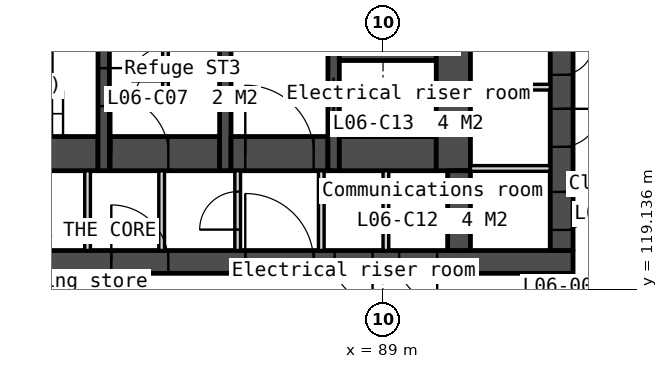
"""IFC4 building model, lengths in metres.
Left out: names, types, materials, properties, quantities, classifications, styles, units other than length and angle.
Written with IfcOpenShell. Run it as: python <this file> out.ifc"""

import sys

from ifc_helpers import new_model, si_unit, direction, frame, frame_2d, origin, place, context, subcontext, project, spatial, polyline, rectangle, outline, extrude, element, fill, save


model = new_model("IFC4")
c1 = context("Model", 3, precision=1e-05, world=origin(), true_north=direction((0.0, 1.0)))
c2 = subcontext(c1, "Body", "Model", "MODEL_VIEW")
j1 = project(units=[si_unit("LENGTHUNIT", "METRE"), si_unit("PLANEANGLEUNIT", "RADIAN")], contexts=[c1])
p1 = place(None, origin())
s1 = spatial("IfcSite", under=j1, at=p1, CompositionType="ELEMENT")
p2 = place(p1, origin())
s2 = spatial("IfcBuilding", under=s1, at=p2, CompositionType="ELEMENT")
p3 = place(p2, frame((0.0, 0.0, 35.0)))
s3 = spatial("IfcBuildingStorey", under=s2, at=p3, CompositionType="ELEMENT", Elevation=35.0)
p4 = place(p3, frame((66.0, 119.85, 0.0), z_axis=(0.0, 0.0, 1.0), x_axis=(1.0, 0.0, 0.0)))
e1 = element("IfcWall", 1, at=p4, inside=s3, PredefinedType="SOLIDWALL", context=c2, shape_type="SweptSolid", body=[
    extrude(rectangle(XDim=28.0, YDim=0.6, at=frame_2d((14.0, 0.0))), origin(), (0.0, 0.0, 1.0), 3.35),
])
p5 = place(p4, frame((6.825, 0.0, 0.0)))
e2 = element("IfcOpeningElement", 2, at=p5, cuts=e1, PredefinedType="OPENING", context=c2, shape_type="SweptSolid", body=[
    extrude(rectangle(XDim=1.8, YDim=2.1, at=frame_2d((0.9, 1.05))), frame((0.0, 0.31, 0.0), z_axis=(0.0, -1.0, 0.0), x_axis=(1.0, 0.0, 0.0)), (0.0, 0.0, 1.0), 0.62),
])
p6 = place(p4, frame((15.85, 0.0, 0.0)))
e3 = element("IfcOpeningElement", 3, at=p6, cuts=e1, PredefinedType="OPENING", context=c2, shape_type="SweptSolid", body=[
    extrude(rectangle(XDim=1.5, YDim=2.1, at=frame_2d((0.75, 1.05))), frame((0.0, 0.31, 0.0), z_axis=(0.0, -1.0, 0.0), x_axis=(1.0, 0.0, 0.0)), (0.0, 0.0, 1.0), 0.62),
])
p7 = place(p4, frame((19.375, 0.0, 0.0)))
e4 = element("IfcOpeningElement", 4, at=p7, cuts=e1, PredefinedType="OPENING", context=c2, shape_type="SweptSolid", body=[
    extrude(rectangle(XDim=1.8, YDim=2.1, at=frame_2d((0.9, 1.05))), frame((0.0, 0.31, 0.0), z_axis=(0.0, -1.0, 0.0), x_axis=(1.0, 0.0, 0.0)), (0.0, 0.0, 1.0), 0.62),
])
p8 = place(p4, frame((4.425, 0.0, 0.0)))
e5 = element("IfcOpeningElement", 5, at=p8, cuts=e1, PredefinedType="OPENING", context=c2, shape_type="SweptSolid", body=[
    extrude(rectangle(XDim=1.0, YDim=2.1, at=frame_2d((0.5, 1.05))), frame((0.0, 0.31, 0.0), z_axis=(0.0, -1.0, 0.0), x_axis=(1.0, 0.0, 0.0)), (0.0, 0.0, 1.0), 0.62),
])
p9 = place(p4, frame((9.925, 0.0, 0.0)))
e6 = element("IfcOpeningElement", 6, at=p9, cuts=e1, PredefinedType="OPENING", context=c2, shape_type="SweptSolid", body=[
    extrude(rectangle(XDim=1.0, YDim=2.1, at=frame_2d((0.5, 1.05))), frame((0.0, 0.31, 0.0), z_axis=(0.0, -1.0, 0.0), x_axis=(1.0, 0.0, 0.0)), (0.0, 0.0, 1.0), 0.62),
])
p10 = place(p4, frame((13.125, 0.0, 0.0)))
e7 = element("IfcOpeningElement", 7, at=p10, cuts=e1, PredefinedType="OPENING", context=c2, shape_type="SweptSolid", body=[
    extrude(rectangle(XDim=1.0, YDim=2.1, at=frame_2d((0.5, 1.05))), frame((0.0, 0.31, 0.0), z_axis=(0.0, -1.0, 0.0), x_axis=(1.0, 0.0, 0.0)), (0.0, 0.0, 1.0), 0.62),
])
p11 = place(p4, frame((21.725, 0.0, 0.0)))
e8 = element("IfcOpeningElement", 8, at=p11, cuts=e1, PredefinedType="OPENING", context=c2, shape_type="SweptSolid", body=[
    extrude(rectangle(XDim=1.0, YDim=2.1, at=frame_2d((0.5, 1.05))), frame((0.0, 0.31, 0.0), z_axis=(0.0, -1.0, 0.0), x_axis=(1.0, 0.0, 0.0)), (0.0, 0.0, 1.0), 0.62),
])
p12 = place(p4, frame((23.425, 0.0, 0.0)))
e9 = element("IfcOpeningElement", 9, at=p12, cuts=e1, PredefinedType="OPENING", context=c2, shape_type="SweptSolid", body=[
    extrude(rectangle(XDim=1.0, YDim=2.1, at=frame_2d((0.5, 1.05))), frame((0.0, 0.31, 0.0), z_axis=(0.0, -1.0, 0.0), x_axis=(1.0, 0.0, 0.0)), (0.0, 0.0, 1.0), 0.62),
])
p13 = place(p3, frame((75.3, 122.7, 0.0), z_axis=(0.0, 0.0, 1.0), x_axis=(1.0, 0.0, 0.0)))
e10 = element("IfcWall", 10, at=p13, inside=s3, PredefinedType="SOLIDWALL", context=c2, shape_type="SweptSolid", body=[
    extrude(rectangle(XDim=6.2, YDim=0.9, at=frame_2d((3.1, 0.0))), origin(), (0.0, 0.0, 1.0), 3.35),
])
p14 = place(p3, frame((81.225, 122.25, 0.0), z_axis=(0.0, 0.0, 1.0), x_axis=(0.0, -1.0, 0.0)))
e11 = element("IfcWall", 11, at=p14, inside=s3, PredefinedType="PARTITIONING", context=c2, shape_type="SweptSolid", body=[
    extrude(rectangle(XDim=2.1, YDim=0.15, at=frame_2d((1.05, 0.0))), origin(), (0.0, 0.0, 1.0), 3.35),
])
p15 = place(p3, frame((81.65, 125.7, 0.0), z_axis=(0.0, 0.0, 1.0), x_axis=(0.0, -1.0, 0.0)))
e12 = element("IfcWall", 12, at=p15, inside=s3, PredefinedType="SOLIDWALL", context=c2, shape_type="SweptSolid", body=[
    extrude(rectangle(XDim=3.45, YDim=0.3, at=frame_2d((1.725, 0.0))), origin(), (0.0, 0.0, 1.0), 3.35),
])
p16 = place(p15, frame((0.75, 0.0, 0.0)))
e13 = element("IfcOpeningElement", 13, at=p16, cuts=e12, PredefinedType="OPENING", context=c2, shape_type="SweptSolid", body=[
    extrude(rectangle(XDim=1.0, YDim=2.1, at=frame_2d((0.5, 1.05))), frame((0.0, 0.16, 0.0), z_axis=(0.0, -1.0, 0.0), x_axis=(1.0, 0.0, 0.0)), (0.0, 0.0, 1.0), 0.32),
])
p17 = place(p3, frame((81.8, 122.7, 0.0), z_axis=(0.0, 0.0, 1.0), x_axis=(1.0, 0.0, 0.0)))
e14 = element("IfcWall", 14, at=p17, inside=s3, PredefinedType="SOLIDWALL", context=c2, shape_type="SweptSolid", body=[
    extrude(rectangle(XDim=2.9, YDim=0.9, at=frame_2d((1.45, 0.0))), origin(), (0.0, 0.0, 1.0), 3.35),
])
p18 = place(p17, frame((0.05, 0.0, 0.0)))
e15 = element("IfcOpeningElement", 15, at=p18, cuts=e14, PredefinedType="OPENING", context=c2, shape_type="SweptSolid", body=[
    extrude(rectangle(XDim=1.5, YDim=2.1, at=frame_2d((0.75, 1.05))), frame((0.0, 0.46, 0.0), z_axis=(0.0, -1.0, 0.0), x_axis=(1.0, 0.0, 0.0)), (0.0, 0.0, 1.0), 0.92),
])
p19 = place(p3, frame((83.175, 122.25, 0.0), z_axis=(0.0, 0.0, 1.0), x_axis=(0.0, -1.0, 0.0)))
e16 = element("IfcWall", 16, at=p19, inside=s3, PredefinedType="PARTITIONING", context=c2, shape_type="SweptSolid", body=[
    extrude(rectangle(XDim=2.1, YDim=0.15, at=frame_2d((1.05, 0.0))), origin(), (0.0, 0.0, 1.0), 3.35),
])
p20 = place(p3, frame((83.275, 125.85, 0.0), z_axis=(0.0, 0.0, 1.0), x_axis=(0.0, -1.0, 0.0)))
e17 = element("IfcWall", 17, at=p20, inside=s3, PredefinedType="PARTITIONING", context=c2, shape_type="SweptSolid", body=[
    extrude(rectangle(XDim=1.75, YDim=0.15, at=frame_2d((0.875, 0.0))), origin(), (0.0, 0.0, 1.0), 3.35),
])
p21 = place(p20, frame((0.35, 0.0, 0.0)))
e18 = element("IfcOpeningElement", 18, at=p21, cuts=e17, PredefinedType="OPENING", context=c2, shape_type="SweptSolid", body=[
    extrude(rectangle(XDim=0.9, YDim=2.1, at=frame_2d((0.45, 1.05))), frame((0.0, 0.085, 0.0), z_axis=(0.0, -1.0, 0.0), x_axis=(1.0, 0.0, 0.0)), (0.0, 0.0, 1.0), 0.17),
])
p22 = place(p3, frame((83.35, 124.175, 0.0), z_axis=(0.0, 0.0, 1.0), x_axis=(1.0, 0.0, 0.0)))
e19 = element("IfcWall", 19, at=p22, inside=s3, PredefinedType="PARTITIONING", context=c2, shape_type="SweptSolid", body=[
    extrude(rectangle(XDim=1.35, YDim=0.15, at=frame_2d((0.675, 0.0))), origin(), (0.0, 0.0, 1.0), 3.35),
])
p23 = place(p3, frame((84.85, 133.95, 0.0), z_axis=(0.0, 0.0, 1.0), x_axis=(0.0, -1.0, 0.0)))
e20 = element("IfcWall", 20, at=p23, inside=s3, PredefinedType="SOLIDWALL", context=c2, shape_type="SweptSolid", body=[
    extrude(rectangle(XDim=11.7, YDim=0.3, at=frame_2d((5.85, 0.0))), origin(), (0.0, 0.0, 1.0), 3.35),
])
p24 = place(p3, frame((85.0, 122.7, 0.0), z_axis=(0.0, 0.0, 1.0), x_axis=(1.0, 0.0, 0.0)))
e21 = element("IfcWall", 21, at=p24, inside=s3, PredefinedType="SOLIDWALL", context=c2, shape_type="SweptSolid", body=[
    extrude(rectangle(XDim=2.55, YDim=0.9, at=frame_2d((1.275, 0.0))), origin(), (0.0, 0.0, 1.0), 3.35),
])
p25 = place(p24, frame((0.375, 0.0, 0.0)))
e22 = element("IfcOpeningElement", 22, at=p25, cuts=e21, PredefinedType="OPENING", context=c2, shape_type="SweptSolid", body=[
    extrude(rectangle(XDim=1.8, YDim=2.1, at=frame_2d((0.9, 1.05))), frame((0.0, 0.46, 0.0), z_axis=(0.0, -1.0, 0.0), x_axis=(1.0, 0.0, 0.0)), (0.0, 0.0, 1.0), 0.92),
])
p26 = place(p3, frame((85.175, 122.25, 0.0), z_axis=(0.0, 0.0, 1.0), x_axis=(0.0, -1.0, 0.0)))
e23 = element("IfcWall", 23, at=p26, inside=s3, PredefinedType="PARTITIONING", context=c2, shape_type="SweptSolid", body=[
    extrude(rectangle(XDim=2.1, YDim=0.15, at=frame_2d((1.05, 0.0))), origin(), (0.0, 0.0, 1.0), 3.35),
])
p27 = place(p26, frame((0.55, 0.0, 0.0)))
e24 = element("IfcOpeningElement", 24, at=p27, cuts=e23, PredefinedType="OPENING", context=c2, shape_type="SweptSolid", body=[
    extrude(rectangle(XDim=1.0, YDim=2.1, at=frame_2d((0.5, 1.05))), frame((0.0, 0.085, 0.0), z_axis=(0.0, -1.0, 0.0), x_axis=(1.0, 0.0, 0.0)), (0.0, 0.0, 1.0), 0.17),
])
p28 = place(p3, frame((87.375, 122.25, 0.0), z_axis=(0.0, 0.0, 1.0), x_axis=(0.0, -1.0, 0.0)))
e25 = element("IfcWall", 25, at=p28, inside=s3, PredefinedType="PARTITIONING", context=c2, shape_type="SweptSolid", body=[
    extrude(rectangle(XDim=2.1, YDim=0.15, at=frame_2d((1.05, 0.0))), origin(), (0.0, 0.0, 1.0), 3.35),
])
p29 = place(p3, frame((87.7, 133.95, 0.0), z_axis=(0.0, 0.0, 1.0), x_axis=(0.0, -1.0, 0.0)))
e26 = element("IfcWall", 26, at=p29, inside=s3, PredefinedType="SOLIDWALL", context=c2, shape_type="SweptSolid", body=[
    extrude(rectangle(XDim=11.7, YDim=0.3, at=frame_2d((5.85, 0.0))), origin(), (0.0, 0.0, 1.0), 3.35),
])
p30 = place(p29, frame((6.95, 0.0, 0.0)))
e27 = element("IfcOpeningElement", 27, at=p30, cuts=e26, PredefinedType="OPENING", context=c2, shape_type="SweptSolid", body=[
    extrude(rectangle(XDim=1.1, YDim=2.1, at=frame_2d((0.55, 1.05))), frame((0.0, 0.16, 0.0), z_axis=(0.0, -1.0, 0.0), x_axis=(1.0, 0.0, 0.0)), (0.0, 0.0, 1.0), 0.32),
])
p31 = place(p29, frame((5.1, 0.0, 0.0)))
e28 = element("IfcOpeningElement", 28, at=p31, cuts=e26, PredefinedType="OPENING", context=c2, shape_type="SweptSolid", body=[
    extrude(rectangle(XDim=1.0, YDim=2.1, at=frame_2d((0.5, 1.05))), frame((0.0, 0.16, 0.0), z_axis=(0.0, -1.0, 0.0), x_axis=(1.0, 0.0, 0.0)), (0.0, 0.0, 1.0), 0.32),
])
p32 = place(p29, frame((9.25, 0.0, 0.0)))
e29 = element("IfcOpeningElement", 29, at=p32, cuts=e26, PredefinedType="OPENING", context=c2, shape_type="SweptSolid", body=[
    extrude(rectangle(XDim=1.1, YDim=2.1, at=frame_2d((0.55, 1.05))), frame((0.0, 0.16, 0.0), z_axis=(0.0, -1.0, 0.0), x_axis=(1.0, 0.0, 0.0)), (0.0, 0.0, 1.0), 0.32),
])
p33 = place(p3, frame((87.85, 125.3, 0.0), z_axis=(0.0, 0.0, 1.0), x_axis=(1.0, 0.0, 0.0)))
e30 = element("IfcWall", 30, at=p33, inside=s3, PredefinedType="SOLIDWALL", context=c2, shape_type="SweptSolid", body=[
    extrude(rectangle(XDim=2.55, YDim=0.3, at=frame_2d((1.275, 0.0))), origin(), (0.0, 0.0, 1.0), 3.35),
])
p34 = place(p3, frame((87.85, 122.7, 0.0), z_axis=(0.0, 0.0, 1.0), x_axis=(1.0, 0.0, 0.0)))
e31 = element("IfcWall", 31, at=p34, inside=s3, PredefinedType="SOLIDWALL", context=c2, shape_type="SweptSolid", body=[
    extrude(rectangle(XDim=2.55, YDim=0.9, at=frame_2d((1.275, 0.0))), origin(), (0.0, 0.0, 1.0), 3.35),
])
p35 = place(p3, frame((89.075, 122.25, 0.0), z_axis=(0.0, 0.0, 1.0), x_axis=(0.0, -1.0, 0.0)))
e32 = element("IfcWall", 32, at=p35, inside=s3, PredefinedType="PARTITIONING", context=c2, shape_type="SweptSolid", body=[
    extrude(rectangle(XDim=2.1, YDim=0.15, at=frame_2d((1.05, 0.0))), origin(), (0.0, 0.0, 1.0), 3.35),
])
p36 = place(p3, frame((90.85, 133.95, 0.0), z_axis=(0.0, 0.0, 1.0), x_axis=(0.0, -1.0, 0.0)))
e33 = element("IfcWall", 33, at=p36, inside=s3, PredefinedType="SOLIDWALL", context=c2, shape_type="SweptSolid", body=[
    extrude(rectangle(XDim=11.7, YDim=0.9, at=frame_2d((5.85, 0.0))), origin(), (0.0, 0.0, 1.0), 3.35),
])
p37 = place(p3, frame((91.0, 122.25, 0.0), z_axis=(0.0, 0.0, 1.0), x_axis=(0.0, -1.0, 0.0)))
e34 = element("IfcWall", 34, at=p37, inside=s3, PredefinedType="SOLIDWALL", context=c2, shape_type="SweptSolid", body=[
    extrude(rectangle(XDim=2.1, YDim=0.6, at=frame_2d((1.05, 0.0))), origin(), (0.0, 0.0, 1.0), 3.35),
])
for number, where, z_axis, x_axis in (
    (35, (91.3, 124.449, 0.0), (0.0, 0.0, 1.0), (1.0, 0.0, 0.0)),
    (36, (91.3, 122.309, 0.0), (0.0, 0.0, 1.0), (1.0, 0.0, 0.0)),
):
    element("IfcWall", number, at=place(p3, frame(where, z_axis=z_axis, x_axis=x_axis)), inside=s3, PredefinedType="PARTITIONING", context=c2, shape_type="SweptSolid", body=[
        extrude(rectangle(XDim=2.1, YDim=0.15, at=frame_2d((1.05, 0.0))), origin(), (0.0, 0.0, 1.0), 3.35),
    ])
p38 = place(p3, frame((93.7, 133.95, 0.0), z_axis=(0.0, 0.0, 1.0), x_axis=(0.0, -1.0, 0.0)))
e37 = element("IfcWall", 37, at=p38, inside=s3, PredefinedType="SOLIDWALL", context=c2, shape_type="SweptSolid", body=[
    extrude(rectangle(XDim=13.8, YDim=0.6, at=frame_2d((6.9, 0.0))), origin(), (0.0, 0.0, 1.0), 3.35),
])
p39 = place(p38, frame((0.6, 0.0, 0.0)))
e38 = element("IfcOpeningElement", 38, at=p39, cuts=e37, PredefinedType="OPENING", context=c2, shape_type="SweptSolid", body=[
    extrude(rectangle(XDim=1.1, YDim=2.1, at=frame_2d((0.55, 1.05))), frame((0.0, 0.31, 0.0), z_axis=(0.0, -1.0, 0.0), x_axis=(1.0, 0.0, 0.0)), (0.0, 0.0, 1.0), 0.62),
])
p40 = place(p38, frame((8.35, 0.0, 0.0)))
e39 = element("IfcOpeningElement", 39, at=p40, cuts=e37, PredefinedType="OPENING", context=c2, shape_type="SweptSolid", body=[
    extrude(rectangle(XDim=0.826, YDim=2.1, at=frame_2d((0.413, 1.05))), frame((0.0, 0.31, 0.0), z_axis=(0.0, -1.0, 0.0), x_axis=(1.0, 0.0, 0.0)), (0.0, 0.0, 1.0), 0.62),
])
p41 = place(p38, frame((10.071, 0.0, 0.0)))
e40 = element("IfcOpeningElement", 40, at=p41, cuts=e37, PredefinedType="OPENING", context=c2, shape_type="SweptSolid", body=[
    extrude(rectangle(XDim=1.0, YDim=2.1, at=frame_2d((0.5, 1.05))), frame((0.0, 0.31, 0.0), z_axis=(0.0, -1.0, 0.0), x_axis=(1.0, 0.0, 0.0)), (0.0, 0.0, 1.0), 0.62),
])
p42 = place(p38, frame((12.258, 0.0, 0.0)))
e41 = element("IfcOpeningElement", 41, at=p42, cuts=e37, PredefinedType="OPENING", context=c2, shape_type="SweptSolid", body=[
    extrude(rectangle(XDim=1.0, YDim=2.1, at=frame_2d((0.5, 1.05))), frame((0.0, 0.31, 0.0), z_axis=(0.0, -1.0, 0.0), x_axis=(1.0, 0.0, 0.0)), (0.0, 0.0, 1.0), 0.62),
])
p43 = place(p3, frame((83.105, 90.599, -0.2), z_axis=(0.0, 0.0, 1.0), x_axis=(0.499999201451, 0.866025864826, 0.0)))
e42 = element("IfcWall", 42, at=p43, inside=s3, PredefinedType="SOLIDWALL", context=c2, shape_type="SweptSolid", body=[
    extrude(outline(polyline([(44.8, 0.0), (44.8, 3.55), (0.0, 3.55), (0.0, 0.0), (44.8, 0.0)])), frame((0.0, 0.225, 0.0), z_axis=(0.0, -1.0, 0.0), x_axis=(1.0, 0.0, 0.0)), (0.0, 0.0, 1.0), 0.45),
])
p44 = place(p43, frame((2.43, 0.0, 1.1)))
e43 = element("IfcOpeningElement", 43, at=p44, cuts=e42, PredefinedType="OPENING", context=c2, shape_type="SweptSolid", body=[
    extrude(rectangle(XDim=1.8, YDim=1.5, at=frame_2d((0.9, 0.75))), frame((0.0, 0.235, 0.0), z_axis=(0.0, -1.0, 0.0), x_axis=(1.0, 0.0, 0.0)), (0.0, 0.0, 1.0), 0.47),
])
p45 = place(p43, frame((4.73, 0.0, 0.2)))
e44 = element("IfcOpeningElement", 44, at=p45, cuts=e42, PredefinedType="OPENING", context=c2, shape_type="SweptSolid", body=[
    extrude(rectangle(XDim=1.8, YDim=2.4, at=frame_2d((0.9, 1.2))), frame((0.0, 0.235, 0.0), z_axis=(0.0, -1.0, 0.0), x_axis=(1.0, 0.0, 0.0)), (0.0, 0.0, 1.0), 0.47),
])
p46 = place(p43, frame((11.39, 0.0, 1.1)))
e45 = element("IfcOpeningElement", 45, at=p46, cuts=e42, PredefinedType="OPENING", context=c2, shape_type="SweptSolid", body=[
    extrude(rectangle(XDim=1.8, YDim=1.5, at=frame_2d((0.9, 0.75))), frame((0.0, 0.235, 0.0), z_axis=(0.0, -1.0, 0.0), x_axis=(1.0, 0.0, 0.0)), (0.0, 0.0, 1.0), 0.47),
])
p47 = place(p43, frame((13.69, 0.0, 1.1)))
e46 = element("IfcOpeningElement", 46, at=p47, cuts=e42, PredefinedType="OPENING", context=c2, shape_type="SweptSolid", body=[
    extrude(rectangle(XDim=1.8, YDim=1.5, at=frame_2d((0.9, 0.75))), frame((0.0, 0.235, 0.0), z_axis=(0.0, -1.0, 0.0), x_axis=(1.0, 0.0, 0.0)), (0.0, 0.0, 1.0), 0.47),
])
p48 = place(p43, frame((20.35, 0.0, 0.2)))
e47 = element("IfcOpeningElement", 47, at=p48, cuts=e42, PredefinedType="OPENING", context=c2, shape_type="SweptSolid", body=[
    extrude(rectangle(XDim=1.8, YDim=2.4, at=frame_2d((0.9, 1.2))), frame((0.0, 0.235, 0.0), z_axis=(0.0, -1.0, 0.0), x_axis=(1.0, 0.0, 0.0)), (0.0, 0.0, 1.0), 0.47),
])
p49 = place(p43, frame((22.65, 0.0, 1.1)))
e48 = element("IfcOpeningElement", 48, at=p49, cuts=e42, PredefinedType="OPENING", context=c2, shape_type="SweptSolid", body=[
    extrude(rectangle(XDim=1.8, YDim=1.5, at=frame_2d((0.9, 0.75))), frame((0.0, 0.235, 0.0), z_axis=(0.0, -1.0, 0.0), x_axis=(1.0, 0.0, 0.0)), (0.0, 0.0, 1.0), 0.47),
])
p50 = place(p43, frame((29.31, 0.0, 1.1)))
e49 = element("IfcOpeningElement", 49, at=p50, cuts=e42, PredefinedType="OPENING", context=c2, shape_type="SweptSolid", body=[
    extrude(rectangle(XDim=1.8, YDim=1.5, at=frame_2d((0.9, 0.75))), frame((0.0, 0.235, 0.0), z_axis=(0.0, -1.0, 0.0), x_axis=(1.0, 0.0, 0.0)), (0.0, 0.0, 1.0), 0.47),
])
p51 = place(p43, frame((31.61, 0.0, 0.2)))
e50 = element("IfcOpeningElement", 50, at=p51, cuts=e42, PredefinedType="OPENING", context=c2, shape_type="SweptSolid", body=[
    extrude(rectangle(XDim=1.8, YDim=2.4, at=frame_2d((0.9, 1.2))), frame((0.0, 0.235, 0.0), z_axis=(0.0, -1.0, 0.0), x_axis=(1.0, 0.0, 0.0)), (0.0, 0.0, 1.0), 0.47),
])
p52 = place(p43, frame((38.27, 0.0, 1.1)))
e51 = element("IfcOpeningElement", 51, at=p52, cuts=e42, PredefinedType="OPENING", context=c2, shape_type="SweptSolid", body=[
    extrude(rectangle(XDim=1.8, YDim=1.5, at=frame_2d((0.9, 0.75))), frame((0.0, 0.235, 0.0), z_axis=(0.0, -1.0, 0.0), x_axis=(1.0, 0.0, 0.0)), (0.0, 0.0, 1.0), 0.47),
])
p53 = place(p43, frame((40.57, 0.0, 1.1)))
e52 = element("IfcOpeningElement", 52, at=p53, cuts=e42, PredefinedType="OPENING", context=c2, shape_type="SweptSolid", body=[
    extrude(rectangle(XDim=1.8, YDim=1.5, at=frame_2d((0.9, 0.75))), frame((0.0, 0.235, 0.0), z_axis=(0.0, -1.0, 0.0), x_axis=(1.0, 0.0, 0.0)), (0.0, 0.0, 1.0), 0.47),
])
p54 = place(p3, frame((110.208, 129.091, 0.0), z_axis=(0.0, 0.0, 1.0), x_axis=(-0.500001932243, -0.8660242882, 0.0)))
e53 = element("IfcWall", 53, at=p54, inside=s3, PredefinedType="STANDARD", context=c2, shape_type="SweptSolid", body=[
    extrude(rectangle(XDim=54.747, YDim=1.0, at=frame_2d((27.374, 0.0))), origin(), (0.0, 0.0, 1.0), 0.6),
])
p55 = place(p40, origin())
e54 = element("IfcDoor", 54, at=p55, inside=s3, OperationType="SINGLE_SWING_LEFT", PredefinedType="DOOR", context=c2, shape_type="SweptSolid", body=[
    extrude(rectangle(XDim=0.826, YDim=2.1, at=frame_2d((0.413, 1.05))), frame((0.0, 0.025, 0.0), z_axis=(0.0, -1.0, 0.0), x_axis=(1.0, 0.0, 0.0)), (0.0, 0.0, 1.0), 0.05),
])
fill(e39, e54)
p56 = place(p41, origin())
e55 = element("IfcDoor", 55, at=p56, inside=s3, OperationType="SINGLE_SWING_LEFT", PredefinedType="DOOR", context=c2, shape_type="SweptSolid", body=[
    extrude(rectangle(XDim=1.0, YDim=2.1, at=frame_2d((0.5, 1.05))), frame((0.0, 0.025, 0.0), z_axis=(0.0, -1.0, 0.0), x_axis=(1.0, 0.0, 0.0)), (0.0, 0.0, 1.0), 0.05),
])
fill(e40, e55)
p57 = place(p42, origin())
e56 = element("IfcDoor", 56, at=p57, inside=s3, OperationType="SINGLE_SWING_LEFT", PredefinedType="DOOR", context=c2, shape_type="SweptSolid", body=[
    extrude(rectangle(XDim=1.0, YDim=2.1, at=frame_2d((0.5, 1.05))), frame((0.0, 0.025, 0.0), z_axis=(0.0, -1.0, 0.0), x_axis=(1.0, 0.0, 0.0)), (0.0, 0.0, 1.0), 0.05),
])
fill(e41, e56)
p58 = place(p25, origin())
e57 = element("IfcDoor", 57, at=p58, inside=s3, OperationType="DOUBLE_DOOR_DOUBLE_SWING", PredefinedType="DOOR", context=c2, shape_type="SweptSolid", body=[
    extrude(rectangle(XDim=1.8, YDim=2.1, at=frame_2d((0.9, 1.05))), frame((0.0, 0.025, 0.0), z_axis=(0.0, -1.0, 0.0), x_axis=(1.0, 0.0, 0.0)), (0.0, 0.0, 1.0), 0.05),
])
fill(e22, e57)
p59 = place(p18, origin())
e58 = element("IfcDoor", 58, at=p59, inside=s3, OperationType="DOUBLE_DOOR_DOUBLE_SWING", PredefinedType="DOOR", context=c2, shape_type="SweptSolid", body=[
    extrude(rectangle(XDim=1.5, YDim=2.1, at=frame_2d((0.75, 1.05))), frame((0.0, 0.025, 0.0), z_axis=(0.0, -1.0, 0.0), x_axis=(1.0, 0.0, 0.0)), (0.0, 0.0, 1.0), 0.05),
])
fill(e15, e58)
p60 = place(p6, origin())
e59 = element("IfcDoor", 59, at=p60, inside=s3, OperationType="DOUBLE_DOOR_DOUBLE_SWING", PredefinedType="DOOR", context=c2, shape_type="SweptSolid", body=[
    extrude(rectangle(XDim=1.5, YDim=2.1, at=frame_2d((0.75, 1.05))), frame((0.0, 0.025, 0.0), z_axis=(0.0, -1.0, 0.0), x_axis=(1.0, 0.0, 0.0)), (0.0, 0.0, 1.0), 0.05),
])
fill(e3, e59)
p61 = place(p7, origin())
e60 = element("IfcDoor", 60, at=p61, inside=s3, OperationType="DOUBLE_DOOR_DOUBLE_SWING", PredefinedType="DOOR", context=c2, shape_type="SweptSolid", body=[
    extrude(rectangle(XDim=1.8, YDim=2.1, at=frame_2d((0.9, 1.05))), frame((0.0, 0.025, 0.0), z_axis=(0.0, -1.0, 0.0), x_axis=(1.0, 0.0, 0.0)), (0.0, 0.0, 1.0), 0.05),
])
fill(e4, e60)
p62 = place(p21, origin())
e61 = element("IfcDoor", 61, at=p62, inside=s3, OperationType="SINGLE_SWING_RIGHT", PredefinedType="DOOR", context=c2, shape_type="SweptSolid", body=[
    extrude(rectangle(XDim=0.9, YDim=2.1, at=frame_2d((0.45, 1.05))), frame((0.0, 0.025, 0.0), z_axis=(0.0, -1.0, 0.0), x_axis=(1.0, 0.0, 0.0)), (0.0, 0.0, 1.0), 0.05),
])
fill(e18, e61)
p63 = place(p27, origin())
e62 = element("IfcDoor", 62, at=p63, inside=s3, OperationType="SINGLE_SWING_RIGHT", PredefinedType="DOOR", context=c2, shape_type="SweptSolid", body=[
    extrude(rectangle(XDim=1.0, YDim=2.1, at=frame_2d((0.5, 1.05))), frame((0.0, 0.025, 0.0), z_axis=(0.0, -1.0, 0.0), x_axis=(1.0, 0.0, 0.0)), (0.0, 0.0, 1.0), 0.05),
])
fill(e24, e62)
p64 = place(p11, origin())
e63 = element("IfcDoor", 63, at=p64, inside=s3, OperationType="SINGLE_SWING_RIGHT", PredefinedType="DOOR", context=c2, shape_type="SweptSolid", body=[
    extrude(rectangle(XDim=1.0, YDim=2.1, at=frame_2d((0.5, 1.05))), frame((0.0, 0.025, 0.0), z_axis=(0.0, -1.0, 0.0), x_axis=(1.0, 0.0, 0.0)), (0.0, 0.0, 1.0), 0.05),
])
fill(e8, e63)
p65 = place(p12, origin())
e64 = element("IfcDoor", 64, at=p65, inside=s3, OperationType="SINGLE_SWING_RIGHT", PredefinedType="DOOR", context=c2, shape_type="SweptSolid", body=[
    extrude(rectangle(XDim=1.0, YDim=2.1, at=frame_2d((0.5, 1.05))), frame((0.0, 0.025, 0.0), z_axis=(0.0, -1.0, 0.0), x_axis=(1.0, 0.0, 0.0)), (0.0, 0.0, 1.0), 0.05),
])
fill(e9, e64)
p66 = place(p16, origin())
e65 = element("IfcDoor", 65, at=p66, inside=s3, OperationType="SINGLE_SWING_LEFT", PredefinedType="DOOR", context=c2, shape_type="SweptSolid", body=[
    extrude(rectangle(XDim=1.0, YDim=2.1, at=frame_2d((0.5, 1.05))), frame((0.0, 0.025, 0.0), z_axis=(0.0, -1.0, 0.0), x_axis=(1.0, 0.0, 0.0)), (0.0, 0.0, 1.0), 0.05),
])
fill(e13, e65)
p67 = place(p32, origin())
e66 = element("IfcDoor", 66, at=p67, inside=s3, OperationType="SLIDING_TO_LEFT", PredefinedType="DOOR", context=c2, shape_type="SweptSolid", body=[
    extrude(rectangle(XDim=1.1, YDim=2.1, at=frame_2d((0.55, 1.05))), frame((0.0, 0.025, 0.0), z_axis=(0.0, -1.0, 0.0), x_axis=(1.0, 0.0, 0.0)), (0.0, 0.0, 1.0), 0.05),
])
fill(e29, e66)
save(model, sys.argv[1])
